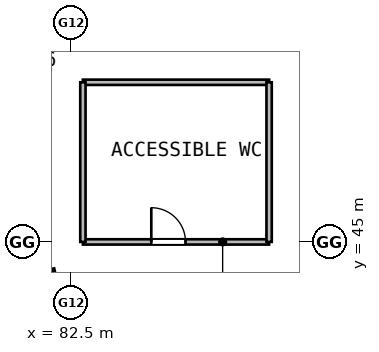
"""IFC4 building model, lengths in metres.
Left out: names, types, materials, properties, quantities, classifications, styles, units other than length and angle.
Written with IfcOpenShell. Run it as: python <this file> out.ifc"""

import sys

from ifc_helpers import new_model, si_unit, direction, frame, frame_2d, origin, origin_2d, place, context, subcontext, project, spatial, rectangle, hollow_rectangle, extrude, element, fill, save


model = new_model("IFC4")
c1 = context("Model", 3, precision=1e-05, world=origin(), true_north=direction((0.0, 1.0)))
c2 = subcontext(c1, "Body", "Model", "MODEL_VIEW")
j1 = project(units=[si_unit("LENGTHUNIT", "METRE"), si_unit("PLANEANGLEUNIT", "RADIAN")], contexts=[c1])
p1 = place(None, origin())
s1 = spatial("IfcSite", under=j1, at=p1, CompositionType="ELEMENT")
p2 = place(p1, origin())
s2 = spatial("IfcBuilding", under=s1, at=p2, CompositionType="ELEMENT")
p3 = place(p2, origin())
s3 = spatial("IfcBuildingStorey", under=s2, at=p3, CompositionType="ELEMENT", Elevation=0.0)
p4 = place(p3, frame((81.403, 43.313, 0.0), z_axis=(0.0, 0.0, 1.0), x_axis=(0.978147600734, 0.207911690818, 0.0)))
e1 = element("IfcColumn", 1, at=p4, inside=s3, PredefinedType="COLUMN", context=c2, shape_type="SweptSolid", body=[
    extrude(hollow_rectangle(XDim=1.6, YDim=1.6, WallThickness=0.04, at=origin_2d()), origin(), (0.0, 0.0, 1.0), 6.0),
])
p5 = place(p3, frame((82.8, 45.0, 0.0), z_axis=(0.0, 0.0, 1.0), x_axis=(1.0, 0.0, 0.0)))
e2 = element("IfcWall", 2, at=p5, inside=s3, PredefinedType="PARTITIONING", context=c2, shape_type="SweptSolid", body=[
    extrude(rectangle(XDim=4.9, YDim=0.14, at=frame_2d((2.45, 0.0))), origin(), (0.0, 0.0, 1.0), 5.68),
])
p6 = place(p5, frame((1.8, 0.0, 0.0)))
e3 = element("IfcOpeningElement", 3, at=p6, cuts=e2, PredefinedType="OPENING", context=c2, shape_type="SweptSolid", body=[
    extrude(rectangle(XDim=0.9, YDim=2.05, at=frame_2d((0.45, 1.025))), frame((0.0, 0.08, 0.0), z_axis=(0.0, -1.0, 0.0), x_axis=(1.0, 0.0, 0.0)), (0.0, 0.0, 1.0), 0.16),
])
p7 = place(p3, frame((82.8, 49.2, 0.0), z_axis=(0.0, 0.0, 1.0), x_axis=(1.0, 0.0, 0.0)))
e4 = element("IfcWall", 4, at=p7, inside=s3, PredefinedType="PARTITIONING", context=c2, shape_type="SweptSolid", body=[
    extrude(rectangle(XDim=4.9, YDim=0.14, at=frame_2d((2.45, 0.0))), origin(), (0.0, 0.0, 1.0), 5.68),
])
for number, where, z_axis, x_axis in (
    (5, (82.8, 45.0, 0.0), (0.0, 0.0, 1.0), (0.0, 1.0, 0.0)),
    (6, (87.7, 45.0, 0.0), (0.0, 0.0, 1.0), (0.0, 1.0, 0.0)),
):
    element("IfcWall", number, at=place(p3, frame(where, z_axis=z_axis, x_axis=x_axis)), inside=s3, PredefinedType="PARTITIONING", context=c2, shape_type="SweptSolid", body=[
        extrude(rectangle(XDim=4.2, YDim=0.14, at=frame_2d((2.1, 0.0))), origin(), (0.0, 0.0, 1.0), 5.68),
    ])
p8 = place(p6, origin())
e7 = element("IfcDoor", 7, at=p8, inside=s3, OperationType="SINGLE_SWING_LEFT", PredefinedType="DOOR", context=c2, shape_type="SweptSolid", body=[
    extrude(rectangle(XDim=0.9, YDim=2.05, at=frame_2d((0.45, 1.025))), frame((0.0, 0.025, 0.0), z_axis=(0.0, -1.0, 0.0), x_axis=(1.0, 0.0, 0.0)), (0.0, 0.0, 1.0), 0.05),
])
fill(e3, e7)
save(model, sys.argv[1])
